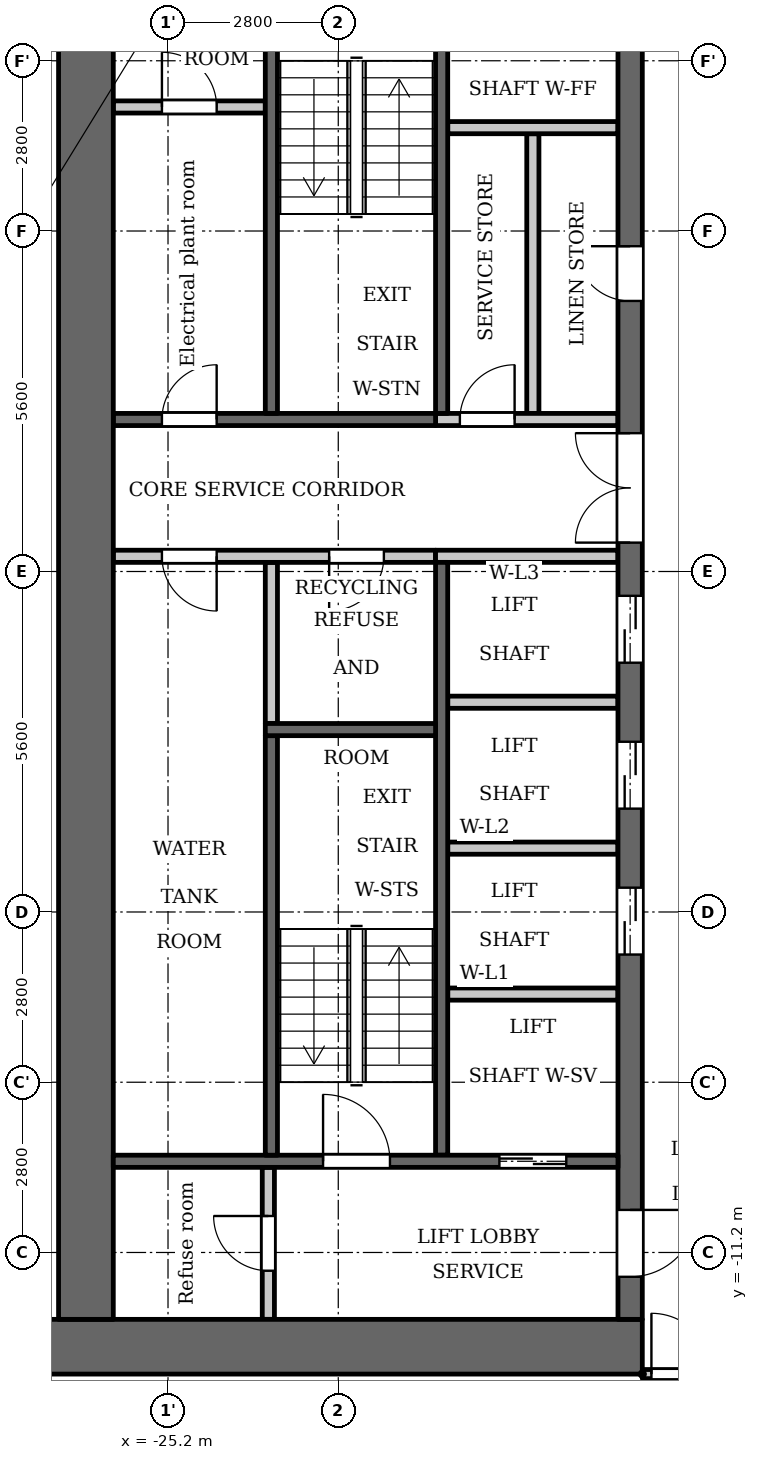
"""IFC4 building model, lengths in metres.
Left out: names, types, materials, properties, quantities, classifications, styles, units other than length and angle.
Written with IfcOpenShell. Run it as: python <this file> out.ifc"""

import sys

from ifc_helpers import new_model, si_unit, direction, frame, frame_2d, origin, place, context, subcontext, project, spatial, rectangle, extrude, element, fill, save


model = new_model("IFC4")
c1 = context("Model", 3, precision=1e-05, world=origin(), true_north=direction((0.0, 1.0)))
c2 = subcontext(c1, "Body", "Model", "MODEL_VIEW")
j1 = project(units=[si_unit("LENGTHUNIT", "METRE"), si_unit("PLANEANGLEUNIT", "RADIAN")], contexts=[c1])
p1 = place(None, origin())
s1 = spatial("IfcSite", under=j1, at=p1, CompositionType="ELEMENT")
p2 = place(p1, origin())
s2 = spatial("IfcBuilding", under=s1, at=p2, CompositionType="ELEMENT")
p3 = place(p2, frame((0.0, 0.0, 107.8)))
s3 = spatial("IfcBuildingStorey", under=s2, at=p3, CompositionType="ELEMENT", Elevation=107.8)
p4 = place(p3, frame((-23.5, -2.5, 0.0), z_axis=(0.0, 0.0, 1.0), x_axis=(0.0, 1.0, 0.0)))
e1 = element("IfcWall", 1, at=p4, inside=s3, PredefinedType="PARTITIONING", context=c2, shape_type="SweptSolid", body=[
    extrude(rectangle(XDim=2.65, YDim=0.2, at=frame_2d((1.325, 0.0))), origin(), (0.0, 0.0, 1.0), 3.2),
])
p5 = place(p3, frame((-20.7, 2.6, 0.0), z_axis=(0.0, 0.0, 1.0), x_axis=(0.0, 1.0, 0.0)))
e2 = element("IfcWall", 2, at=p5, inside=s3, PredefinedType="SHEAR", context=c2, shape_type="SweptSolid", body=[
    extrude(rectangle(XDim=7.0, YDim=0.2, at=frame_2d((3.5, 0.0))), origin(), (0.0, 0.0, 1.0), 3.2),
])
p6 = place(p3, frame((-20.7, -9.6, 0.0), z_axis=(0.0, 0.0, 1.0), x_axis=(0.0, 1.0, 0.0)))
e3 = element("IfcWall", 3, at=p6, inside=s3, PredefinedType="SHEAR", context=c2, shape_type="SweptSolid", body=[
    extrude(rectangle(XDim=9.75, YDim=0.2, at=frame_2d((4.875, 0.0))), origin(), (0.0, 0.0, 1.0), 3.2),
])
p7 = place(p3, frame((-20.8, 2.5, 0.0), z_axis=(0.0, 0.0, 1.0), x_axis=(-1.0, 0.0, 0.0)))
e4 = element("IfcWall", 4, at=p7, inside=s3, PredefinedType="SHEAR", context=c2, shape_type="SweptSolid", body=[
    extrude(rectangle(XDim=5.3, YDim=0.2, at=frame_2d((2.65, 0.0))), origin(), (0.0, 0.0, 1.0), 3.2),
])
p8 = place(p7, frame((3.6, 0.0, 0.0)))
e5 = element("IfcOpeningElement", 5, at=p8, cuts=e4, PredefinedType="OPENING", context=c2, shape_type="SweptSolid", body=[
    extrude(rectangle(XDim=0.9, YDim=2.1, at=frame_2d((0.45, 1.05))), frame((0.0, 0.11, 0.0), z_axis=(0.0, -1.0, 0.0), x_axis=(1.0, 0.0, 0.0)), (0.0, 0.0, 1.0), 0.22),
])
p9 = place(p3, frame((-20.8, 0.25, 0.0), z_axis=(0.0, 0.0, 1.0), x_axis=(-1.0, 0.0, 0.0)))
e6 = element("IfcWall", 6, at=p9, inside=s3, PredefinedType="PARTITIONING", context=c2, shape_type="SweptSolid", body=[
    extrude(rectangle(XDim=5.3, YDim=0.2, at=frame_2d((2.65, 0.0))), origin(), (0.0, 0.0, 1.0), 3.2),
])
p10 = place(p9, frame((0.85, 0.0, 0.0)))
e7 = element("IfcOpeningElement", 7, at=p10, cuts=e6, PredefinedType="OPENING", context=c2, shape_type="SweptSolid", body=[
    extrude(rectangle(XDim=0.9, YDim=2.1, at=frame_2d((0.45, 1.05))), frame((0.0, 0.11, 0.0), z_axis=(0.0, -1.0, 0.0), x_axis=(1.0, 0.0, 0.0)), (0.0, 0.0, 1.0), 0.22),
])
p11 = place(p9, frame((3.6, 0.0, 0.0)))
e8 = element("IfcOpeningElement", 8, at=p11, cuts=e6, PredefinedType="OPENING", context=c2, shape_type="SweptSolid", body=[
    extrude(rectangle(XDim=0.9, YDim=2.1, at=frame_2d((0.45, 1.05))), frame((0.0, 0.11, 0.0), z_axis=(0.0, -1.0, 0.0), x_axis=(1.0, 0.0, 0.0)), (0.0, 0.0, 1.0), 0.22),
])
p12 = place(p3, frame((-17.4, -12.75, 0.0), z_axis=(0.0, 0.0, 1.0), x_axis=(-1.0, 0.0, 0.0)))
e9 = element("IfcWall", 9, at=p12, inside=s3, PredefinedType="SHEAR", context=c2, shape_type="SweptSolid", body=[
    extrude(rectangle(XDim=10.4, YDim=0.9, at=frame_2d((5.2, 0.0))), origin(), (0.0, 0.0, 1.0), 3.2),
])
p13 = place(p3, frame((-19.2, 2.6, 0.0), z_axis=(0.0, 0.0, 1.0), x_axis=(0.0, 1.0, 0.0)))
e10 = element("IfcWall", 10, at=p13, inside=s3, PredefinedType="PARTITIONING", context=c2, shape_type="SweptSolid", body=[
    extrude(rectangle(XDim=4.6, YDim=0.2, at=frame_2d((2.3, 0.0))), origin(), (0.0, 0.0, 1.0), 3.2),
])
p14 = place(p3, frame((-17.6, -12.3, 0.0), z_axis=(0.0, 0.0, 1.0), x_axis=(0.0, 1.0, 0.0)))
e11 = element("IfcWall", 11, at=p14, inside=s3, PredefinedType="SHEAR", context=c2, shape_type="SweptSolid", body=[
    extrude(rectangle(XDim=24.6, YDim=0.4, at=frame_2d((12.3, 0.0))), origin(), (0.0, 0.0, 1.0), 3.2),
])
p15 = place(p14, frame((6.0, 0.0, 0.0)))
e12 = element("IfcOpeningElement", 12, at=p15, cuts=e11, PredefinedType="OPENING", context=c2, shape_type="SweptSolid", body=[
    extrude(rectangle(XDim=1.1, YDim=2.1, at=frame_2d((0.55, 1.05))), frame((0.0, 0.21, 0.0), z_axis=(0.0, -1.0, 0.0), x_axis=(1.0, 0.0, 0.0)), (0.0, 0.0, 1.0), 0.42),
])
p16 = place(p14, frame((8.4, 0.0, 0.0)))
e13 = element("IfcOpeningElement", 13, at=p16, cuts=e11, PredefinedType="OPENING", context=c2, shape_type="SweptSolid", body=[
    extrude(rectangle(XDim=1.1, YDim=2.1, at=frame_2d((0.55, 1.05))), frame((0.0, 0.21, 0.0), z_axis=(0.0, -1.0, 0.0), x_axis=(1.0, 0.0, 0.0)), (0.0, 0.0, 1.0), 0.42),
])
p17 = place(p14, frame((10.8, 0.0, 0.0)))
e14 = element("IfcOpeningElement", 14, at=p17, cuts=e11, PredefinedType="OPENING", context=c2, shape_type="SweptSolid", body=[
    extrude(rectangle(XDim=1.1, YDim=2.1, at=frame_2d((0.55, 1.05))), frame((0.0, 0.21, 0.0), z_axis=(0.0, -1.0, 0.0), x_axis=(1.0, 0.0, 0.0)), (0.0, 0.0, 1.0), 0.42),
])
p18 = place(p14, frame((16.75, 0.0, 0.0)))
e15 = element("IfcOpeningElement", 15, at=p18, cuts=e11, PredefinedType="OPENING", context=c2, shape_type="SweptSolid", body=[
    extrude(rectangle(XDim=0.9, YDim=2.1, at=frame_2d((0.45, 1.05))), frame((0.0, 0.21, 0.0), z_axis=(0.0, -1.0, 0.0), x_axis=(1.0, 0.0, 0.0)), (0.0, 0.0, 1.0), 0.42),
])
p19 = place(p14, frame((22.8, 0.0, 0.0)))
e16 = element("IfcOpeningElement", 16, at=p19, cuts=e11, PredefinedType="OPENING", context=c2, shape_type="SweptSolid", body=[
    extrude(rectangle(XDim=1.1, YDim=2.1, at=frame_2d((0.55, 1.05))), frame((0.0, 0.21, 0.0), z_axis=(0.0, -1.0, 0.0), x_axis=(1.0, 0.0, 0.0)), (0.0, 0.0, 1.0), 0.42),
])
p20 = place(p14, frame((0.7, 0.0, 0.0)))
e17 = element("IfcOpeningElement", 17, at=p20, cuts=e11, PredefinedType="OPENING", context=c2, shape_type="SweptSolid", body=[
    extrude(rectangle(XDim=1.1, YDim=2.1, at=frame_2d((0.55, 1.05))), frame((0.0, 0.21, 0.0), z_axis=(0.0, -1.0, 0.0), x_axis=(1.0, 0.0, 0.0)), (0.0, 0.0, 1.0), 0.42),
])
p21 = place(p14, frame((12.775, 0.0, 0.0)))
e18 = element("IfcOpeningElement", 18, at=p21, cuts=e11, PredefinedType="OPENING", context=c2, shape_type="SweptSolid", body=[
    extrude(rectangle(XDim=1.8, YDim=2.1, at=frame_2d((0.9, 1.05))), frame((0.0, 0.21, 0.0), z_axis=(0.0, -1.0, 0.0), x_axis=(1.0, 0.0, 0.0)), (0.0, 0.0, 1.0), 0.42),
])
p22 = place(p3, frame((-26.55, -12.3, 0.0), z_axis=(0.0, 0.0, 1.0), x_axis=(0.0, 1.0, 0.0)))
e19 = element("IfcWall", 19, at=p22, inside=s3, PredefinedType="SHEAR", context=c2, shape_type="SweptSolid", body=[
    extrude(rectangle(XDim=24.6, YDim=0.9, at=frame_2d((12.3, 0.0))), origin(), (0.0, 0.0, 1.0), 3.2),
])
p23 = place(p3, frame((-23.55, -12.3, 0.0), z_axis=(0.0, 0.0, 1.0), x_axis=(0.0, 1.0, 0.0)))
e20 = element("IfcWall", 20, at=p23, inside=s3, PredefinedType="PARTITIONING", context=c2, shape_type="SweptSolid", body=[
    extrude(rectangle(XDim=2.5, YDim=0.2, at=frame_2d((1.25, 0.0))), origin(), (0.0, 0.0, 1.0), 3.2),
])
p24 = place(p23, frame((0.8, 0.0, 0.0)))
e21 = element("IfcOpeningElement", 21, at=p24, cuts=e20, PredefinedType="OPENING", context=c2, shape_type="SweptSolid", body=[
    extrude(rectangle(XDim=0.9, YDim=2.1, at=frame_2d((0.45, 1.05))), frame((0.0, 0.11, 0.0), z_axis=(0.0, -1.0, 0.0), x_axis=(1.0, 0.0, 0.0)), (0.0, 0.0, 1.0), 0.22),
])
p25 = place(p3, frame((-23.6, 7.64, 0.0), z_axis=(0.0, 0.0, 1.0), x_axis=(-1.0, 0.0, 0.0)))
e22 = element("IfcWall", 22, at=p25, inside=s3, PredefinedType="PARTITIONING", context=c2, shape_type="SweptSolid", body=[
    extrude(rectangle(XDim=2.5, YDim=0.2, at=frame_2d((1.25, 0.0))), origin(), (0.0, 0.0, 1.0), 3.2),
])
p26 = place(p25, frame((0.8, 0.0, 0.0)))
e23 = element("IfcOpeningElement", 23, at=p26, cuts=e22, PredefinedType="OPENING", context=c2, shape_type="SweptSolid", body=[
    extrude(rectangle(XDim=0.9, YDim=2.1, at=frame_2d((0.45, 1.05))), frame((0.0, 0.11, 0.0), z_axis=(0.0, -1.0, 0.0), x_axis=(1.0, 0.0, 0.0)), (0.0, 0.0, 1.0), 0.22),
])
p27 = place(p3, frame((-17.8, -9.7, 0.0), z_axis=(0.0, 0.0, 1.0), x_axis=(-1.0, 0.0, 0.0)))
e24 = element("IfcWall", 24, at=p27, inside=s3, PredefinedType="SHEAR", context=c2, shape_type="SweptSolid", body=[
    extrude(rectangle(XDim=8.3, YDim=0.2, at=frame_2d((4.15, 0.0))), origin(), (0.0, 0.0, 1.0), 3.2),
])
p28 = place(p27, frame((0.85, 0.0, 0.0)))
e25 = element("IfcOpeningElement", 25, at=p28, cuts=e24, PredefinedType="OPENING", context=c2, shape_type="SweptSolid", body=[
    extrude(rectangle(XDim=1.1, YDim=2.1, at=frame_2d((0.55, 1.05))), frame((0.0, 0.11, 0.0), z_axis=(0.0, -1.0, 0.0), x_axis=(1.0, 0.0, 0.0)), (0.0, 0.0, 1.0), 0.22),
])
p29 = place(p27, frame((3.75, 0.0, 0.0)))
e26 = element("IfcOpeningElement", 26, at=p29, cuts=e24, PredefinedType="OPENING", context=c2, shape_type="SweptSolid", body=[
    extrude(rectangle(XDim=1.1, YDim=2.1, at=frame_2d((0.55, 1.05))), frame((0.0, 0.11, 0.0), z_axis=(0.0, -1.0, 0.0), x_axis=(1.0, 0.0, 0.0)), (0.0, 0.0, 1.0), 0.22),
])
for number, where, z_axis, x_axis in (
    (27, (-17.8, -6.95, 0.0), (0.0, 0.0, 1.0), (-1.0, 0.0, 0.0)),
    (28, (-17.8, -4.55, 0.0), (0.0, 0.0, 1.0), (-1.0, 0.0, 0.0)),
    (29, (-17.8, -2.15, 0.0), (0.0, 0.0, 1.0), (-1.0, 0.0, 0.0)),
):
    element("IfcWall", number, at=place(p3, frame(where, z_axis=z_axis, x_axis=x_axis)), inside=s3, PredefinedType="PARTITIONING", context=c2, shape_type="SweptSolid", body=[
        extrude(rectangle(XDim=2.8, YDim=0.2, at=frame_2d((1.4, 0.0))), origin(), (0.0, 0.0, 1.0), 3.2),
    ])
p30 = place(p3, frame((-17.8, 0.25, 0.0), z_axis=(0.0, 0.0, 1.0), x_axis=(-1.0, 0.0, 0.0)))
e30 = element("IfcWall", 30, at=p30, inside=s3, PredefinedType="PARTITIONING", context=c2, shape_type="SweptSolid", body=[
    extrude(rectangle(XDim=3.0, YDim=0.2, at=frame_2d((1.5, 0.0))), origin(), (0.0, 0.0, 1.0), 3.2),
])
p31 = place(p3, frame((-17.8, 2.5, 0.0), z_axis=(0.0, 0.0, 1.0), x_axis=(-1.0, 0.0, 0.0)))
e31 = element("IfcWall", 31, at=p31, inside=s3, PredefinedType="PARTITIONING", context=c2, shape_type="SweptSolid", body=[
    extrude(rectangle(XDim=3.0, YDim=0.2, at=frame_2d((1.5, 0.0))), origin(), (0.0, 0.0, 1.0), 3.2),
])
p32 = place(p31, frame((1.7, 0.0, 0.0)))
e32 = element("IfcOpeningElement", 32, at=p32, cuts=e31, PredefinedType="OPENING", context=c2, shape_type="SweptSolid", body=[
    extrude(rectangle(XDim=0.9, YDim=2.1, at=frame_2d((0.45, 1.05))), frame((0.0, 0.11, 0.0), z_axis=(0.0, -1.0, 0.0), x_axis=(1.0, 0.0, 0.0)), (0.0, 0.0, 1.0), 0.22),
])
p33 = place(p3, frame((-17.8, 7.3, 0.0), z_axis=(0.0, 0.0, 1.0), x_axis=(-1.0, 0.0, 0.0)))
e33 = element("IfcWall", 33, at=p33, inside=s3, PredefinedType="PARTITIONING", context=c2, shape_type="SweptSolid", body=[
    extrude(rectangle(XDim=2.8, YDim=0.2, at=frame_2d((1.4, 0.0))), origin(), (0.0, 0.0, 1.0), 3.2),
])
p34 = place(p3, frame((-23.5, 2.6, 0.0), z_axis=(0.0, 0.0, 1.0), x_axis=(0.0, 1.0, 0.0)))
e34 = element("IfcWall", 34, at=p34, inside=s3, PredefinedType="SHEAR", context=c2, shape_type="SweptSolid", body=[
    extrude(rectangle(XDim=7.0, YDim=0.2, at=frame_2d((3.5, 0.0))), origin(), (0.0, 0.0, 1.0), 3.2),
])
p35 = place(p3, frame((-23.5, -9.6, 0.0), z_axis=(0.0, 0.0, 1.0), x_axis=(0.0, 1.0, 0.0)))
e35 = element("IfcWall", 35, at=p35, inside=s3, PredefinedType="SHEAR", context=c2, shape_type="SweptSolid", body=[
    extrude(rectangle(XDim=6.9, YDim=0.2, at=frame_2d((3.45, 0.0))), origin(), (0.0, 0.0, 1.0), 3.2),
])
p36 = place(p3, frame((-20.8, -2.6, 0.0), z_axis=(0.0, 0.0, 1.0), x_axis=(-1.0, 0.0, 0.0)))
e36 = element("IfcWall", 36, at=p36, inside=s3, PredefinedType="SHEAR", context=c2, shape_type="SweptSolid", body=[
    extrude(rectangle(XDim=2.8, YDim=0.2, at=frame_2d((1.4, 0.0))), origin(), (0.0, 0.0, 1.0), 3.2),
])
p37 = place(p3, frame((-17.4, -13.2, 0.0), z_axis=(0.0, 0.0, 1.0), x_axis=(1.0, 0.0, 0.0)))
e37 = element("IfcWall", 37, at=p37, inside=s3, PredefinedType="PARTITIONING", context=c2, shape_type="SweptSolid", body=[
    extrude(rectangle(XDim=34.8, YDim=0.15, at=frame_2d((17.4, 0.0))), origin(), (0.0, 0.0, 1.0), 3.2),
])
p38 = place(p37, frame((0.15, 0.0, 0.0)))
e38 = element("IfcOpeningElement", 38, at=p38, cuts=e37, PredefinedType="OPENING", context=c2, shape_type="SweptSolid", body=[
    extrude(rectangle(XDim=1.0, YDim=2.1, at=frame_2d((0.5, 1.05))), frame((0.0, 0.085, 0.0), z_axis=(0.0, -1.0, 0.0), x_axis=(1.0, 0.0, 0.0)), (0.0, 0.0, 1.0), 0.17),
])
p39 = place(p37, frame((33.55, 0.0, 0.0)))
e39 = element("IfcOpeningElement", 39, at=p39, cuts=e37, PredefinedType="OPENING", context=c2, shape_type="SweptSolid", body=[
    extrude(rectangle(XDim=1.0, YDim=2.1, at=frame_2d((0.5, 1.05))), frame((0.0, 0.085, 0.0), z_axis=(0.0, -1.0, 0.0), x_axis=(1.0, 0.0, 0.0)), (0.0, 0.0, 1.0), 0.17),
])
p40 = place(p37, frame((8.1, 0.0, 0.0)))
e40 = element("IfcOpeningElement", 40, at=p40, cuts=e37, PredefinedType="OPENING", context=c2, shape_type="SweptSolid", body=[
    extrude(rectangle(XDim=1.0, YDim=2.1, at=frame_2d((0.5, 1.05))), frame((0.0, 0.085, 0.0), z_axis=(0.0, -1.0, 0.0), x_axis=(1.0, 0.0, 0.0)), (0.0, 0.0, 1.0), 0.17),
])
p41 = place(p37, frame((12.45, 0.0, 0.0)))
e41 = element("IfcOpeningElement", 41, at=p41, cuts=e37, PredefinedType="OPENING", context=c2, shape_type="SweptSolid", body=[
    extrude(rectangle(XDim=1.0, YDim=2.1, at=frame_2d((0.5, 1.05))), frame((0.0, 0.085, 0.0), z_axis=(0.0, -1.0, 0.0), x_axis=(1.0, 0.0, 0.0)), (0.0, 0.0, 1.0), 0.17),
])
p42 = place(p37, frame((19.05, 0.0, 0.0)))
e42 = element("IfcOpeningElement", 42, at=p42, cuts=e37, PredefinedType="OPENING", context=c2, shape_type="SweptSolid", body=[
    extrude(rectangle(XDim=1.0, YDim=2.1, at=frame_2d((0.5, 1.05))), frame((0.0, 0.085, 0.0), z_axis=(0.0, -1.0, 0.0), x_axis=(1.0, 0.0, 0.0)), (0.0, 0.0, 1.0), 0.17),
])
p43 = place(p37, frame((24.9, 0.0, 0.0)))
e43 = element("IfcOpeningElement", 43, at=p43, cuts=e37, PredefinedType="OPENING", context=c2, shape_type="SweptSolid", body=[
    extrude(rectangle(XDim=1.0, YDim=2.1, at=frame_2d((0.5, 1.05))), frame((0.0, 0.085, 0.0), z_axis=(0.0, -1.0, 0.0), x_axis=(1.0, 0.0, 0.0)), (0.0, 0.0, 1.0), 0.17),
])
p44 = place(p28, origin())
e44 = element("IfcDoor", 44, at=p44, inside=s3, OperationType="DOUBLE_DOOR_SLIDING", PredefinedType="DOOR", context=c2, shape_type="SweptSolid", body=[
    extrude(rectangle(XDim=1.1, YDim=2.1, at=frame_2d((0.55, 1.05))), frame((0.0, 0.025, 0.0), z_axis=(0.0, -1.0, 0.0), x_axis=(1.0, 0.0, 0.0)), (0.0, 0.0, 1.0), 0.05),
])
fill(e25, e44)
p45 = place(p15, origin())
e45 = element("IfcDoor", 45, at=p45, inside=s3, OperationType="DOUBLE_DOOR_SLIDING", PredefinedType="DOOR", context=c2, shape_type="SweptSolid", body=[
    extrude(rectangle(XDim=1.1, YDim=2.1, at=frame_2d((0.55, 1.05))), frame((0.0, 0.025, 0.0), z_axis=(0.0, -1.0, 0.0), x_axis=(1.0, 0.0, 0.0)), (0.0, 0.0, 1.0), 0.05),
])
fill(e12, e45)
p46 = place(p16, origin())
e46 = element("IfcDoor", 46, at=p46, inside=s3, OperationType="DOUBLE_DOOR_SLIDING", PredefinedType="DOOR", context=c2, shape_type="SweptSolid", body=[
    extrude(rectangle(XDim=1.1, YDim=2.1, at=frame_2d((0.55, 1.05))), frame((0.0, 0.025, 0.0), z_axis=(0.0, -1.0, 0.0), x_axis=(1.0, 0.0, 0.0)), (0.0, 0.0, 1.0), 0.05),
])
fill(e13, e46)
p47 = place(p17, origin())
e47 = element("IfcDoor", 47, at=p47, inside=s3, OperationType="DOUBLE_DOOR_SLIDING", PredefinedType="DOOR", context=c2, shape_type="SweptSolid", body=[
    extrude(rectangle(XDim=1.1, YDim=2.1, at=frame_2d((0.55, 1.05))), frame((0.0, 0.025, 0.0), z_axis=(0.0, -1.0, 0.0), x_axis=(1.0, 0.0, 0.0)), (0.0, 0.0, 1.0), 0.05),
])
fill(e14, e47)
p48 = place(p18, origin())
e48 = element("IfcDoor", 48, at=p48, inside=s3, OperationType="SINGLE_SWING_LEFT", PredefinedType="DOOR", context=c2, shape_type="SweptSolid", body=[
    extrude(rectangle(XDim=0.9, YDim=2.1, at=frame_2d((0.45, 1.05))), frame((0.0, 0.025, 0.0), z_axis=(0.0, -1.0, 0.0), x_axis=(1.0, 0.0, 0.0)), (0.0, 0.0, 1.0), 0.05),
])
fill(e15, e48)
p49 = place(p32, origin())
e49 = element("IfcDoor", 49, at=p49, inside=s3, OperationType="SINGLE_SWING_LEFT", PredefinedType="DOOR", context=c2, shape_type="SweptSolid", body=[
    extrude(rectangle(XDim=0.9, YDim=2.1, at=frame_2d((0.45, 1.05))), frame((0.0, 0.025, 0.0), z_axis=(0.0, -1.0, 0.0), x_axis=(1.0, 0.0, 0.0)), (0.0, 0.0, 1.0), 0.05),
])
fill(e32, e49)
p50 = place(p20, origin())
e50 = element("IfcDoor", 50, at=p50, inside=s3, OperationType="SINGLE_SWING_RIGHT", PredefinedType="DOOR", context=c2, shape_type="SweptSolid", body=[
    extrude(rectangle(XDim=1.1, YDim=2.1, at=frame_2d((0.55, 1.05))), frame((0.0, 0.025, 0.0), z_axis=(0.0, -1.0, 0.0), x_axis=(1.0, 0.0, 0.0)), (0.0, 0.0, 1.0), 0.05),
])
fill(e17, e50)
p51 = place(p24, origin())
e51 = element("IfcDoor", 51, at=p51, inside=s3, OperationType="SINGLE_SWING_LEFT", PredefinedType="DOOR", context=c2, shape_type="SweptSolid", body=[
    extrude(rectangle(XDim=0.9, YDim=2.1, at=frame_2d((0.45, 1.05))), frame((0.0, 0.025, 0.0), z_axis=(0.0, -1.0, 0.0), x_axis=(1.0, 0.0, 0.0)), (0.0, 0.0, 1.0), 0.05),
])
fill(e21, e51)
p52 = place(p29, origin())
e52 = element("IfcDoor", 52, at=p52, inside=s3, OperationType="SINGLE_SWING_RIGHT", PredefinedType="DOOR", context=c2, shape_type="SweptSolid", body=[
    extrude(rectangle(XDim=1.1, YDim=2.1, at=frame_2d((0.55, 1.05))), frame((0.0, 0.025, 0.0), z_axis=(0.0, -1.0, 0.0), x_axis=(1.0, 0.0, 0.0)), (0.0, 0.0, 1.0), 0.05),
])
fill(e26, e52)
p53 = place(p21, origin())
e53 = element("IfcDoor", 53, at=p53, inside=s3, OperationType="DOUBLE_DOOR_SINGLE_SWING", PredefinedType="DOOR", context=c2, shape_type="SweptSolid", body=[
    extrude(rectangle(XDim=1.8, YDim=2.1, at=frame_2d((0.9, 1.05))), frame((0.0, 0.025, 0.0), z_axis=(0.0, -1.0, 0.0), x_axis=(1.0, 0.0, 0.0)), (0.0, 0.0, 1.0), 0.05),
])
fill(e18, e53)
p54 = place(p10, origin())
e54 = element("IfcDoor", 54, at=p54, inside=s3, OperationType="SINGLE_SWING_LEFT", PredefinedType="DOOR", context=c2, shape_type="SweptSolid", body=[
    extrude(rectangle(XDim=0.9, YDim=2.1, at=frame_2d((0.45, 1.05))), frame((0.0, 0.025, 0.0), z_axis=(0.0, -1.0, 0.0), x_axis=(1.0, 0.0, 0.0)), (0.0, 0.0, 1.0), 0.05),
])
fill(e7, e54)
p55 = place(p11, origin())
e55 = element("IfcDoor", 55, at=p55, inside=s3, OperationType="SINGLE_SWING_RIGHT", PredefinedType="DOOR", context=c2, shape_type="SweptSolid", body=[
    extrude(rectangle(XDim=0.9, YDim=2.1, at=frame_2d((0.45, 1.05))), frame((0.0, 0.025, 0.0), z_axis=(0.0, -1.0, 0.0), x_axis=(1.0, 0.0, 0.0)), (0.0, 0.0, 1.0), 0.05),
])
fill(e8, e55)
p56 = place(p26, origin())
e56 = element("IfcDoor", 56, at=p56, inside=s3, OperationType="SINGLE_SWING_RIGHT", PredefinedType="DOOR", context=c2, shape_type="SweptSolid", body=[
    extrude(rectangle(XDim=0.9, YDim=2.1, at=frame_2d((0.45, 1.05))), frame((0.0, 0.025, 0.0), z_axis=(0.0, -1.0, 0.0), x_axis=(1.0, 0.0, 0.0)), (0.0, 0.0, 1.0), 0.05),
])
fill(e23, e56)
p57 = place(p8, origin())
e57 = element("IfcDoor", 57, at=p57, inside=s3, OperationType="SINGLE_SWING_LEFT", PredefinedType="DOOR", context=c2, shape_type="SweptSolid", body=[
    extrude(rectangle(XDim=0.9, YDim=2.1, at=frame_2d((0.45, 1.05))), frame((0.0, 0.025, 0.0), z_axis=(0.0, -1.0, 0.0), x_axis=(1.0, 0.0, 0.0)), (0.0, 0.0, 1.0), 0.05),
])
fill(e5, e57)
p58 = place(p38, origin())
e58 = element("IfcDoor", 58, at=p58, inside=s3, OperationType="SINGLE_SWING_RIGHT", PredefinedType="DOOR", context=c2, shape_type="SweptSolid", body=[
    extrude(rectangle(XDim=1.0, YDim=2.1, at=frame_2d((0.5, 1.05))), frame((0.0, 0.025, 0.0), z_axis=(0.0, -1.0, 0.0), x_axis=(1.0, 0.0, 0.0)), (0.0, 0.0, 1.0), 0.05),
])
fill(e38, e58)
save(model, sys.argv[1])
